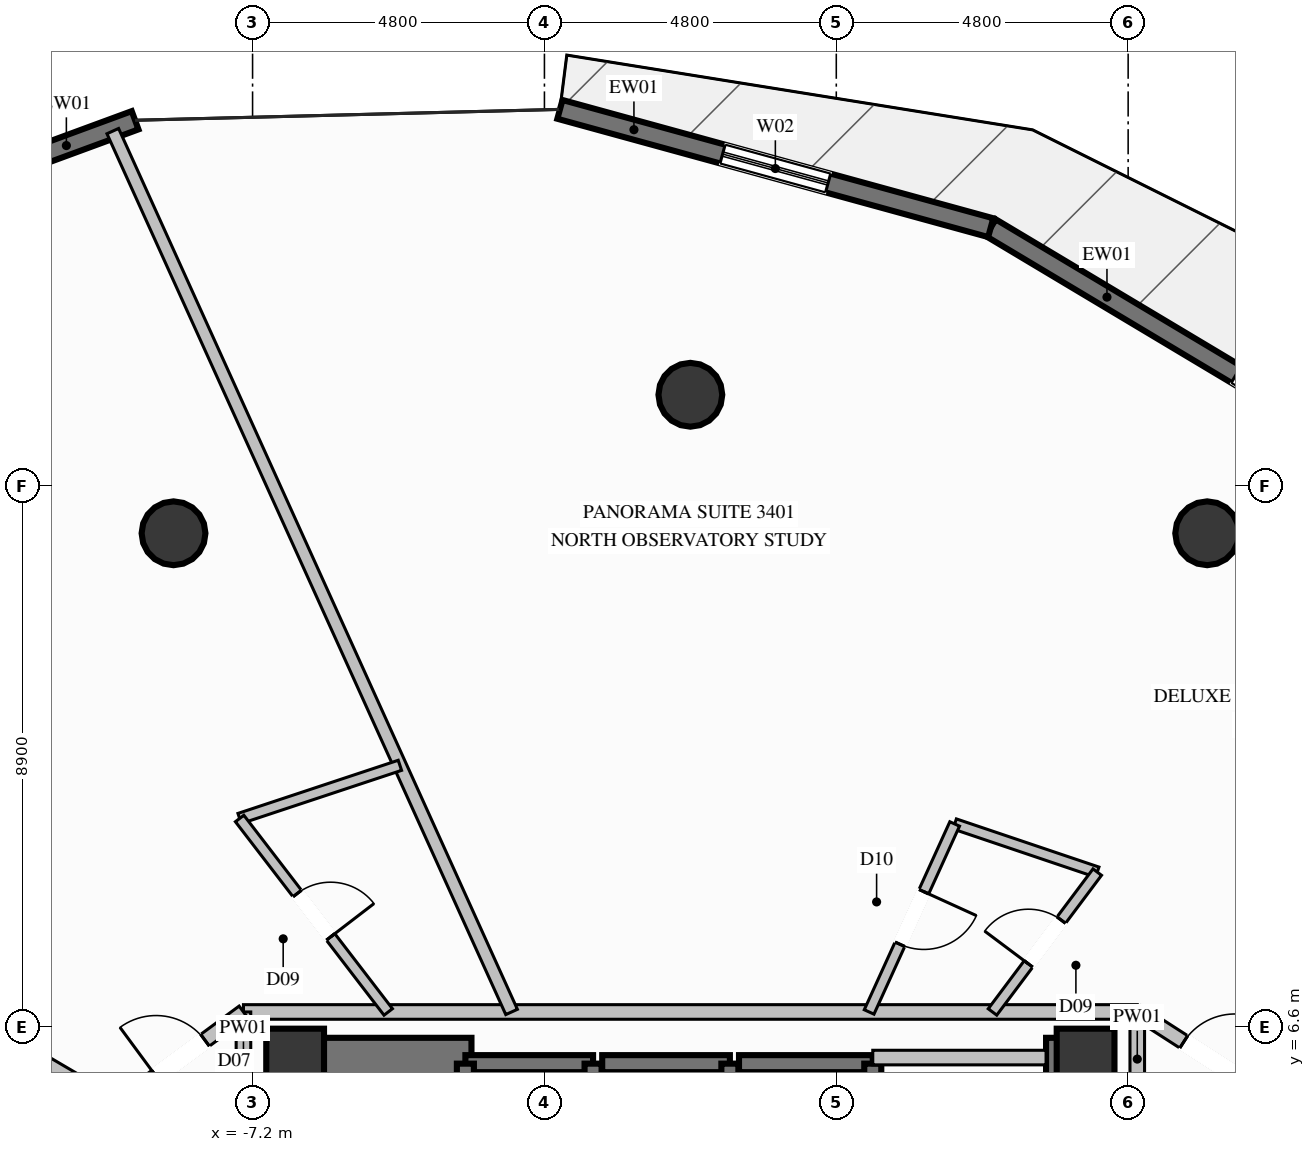
"""IFC4 building model, lengths in metres.
Left out: names, types, materials, properties, quantities, classifications, styles, units other than length and angle.
Written with IfcOpenShell. Run it as: python <this file> out.ifc"""

import sys

from ifc_helpers import new_model, si_unit, direction, frame, frame_2d, origin, origin_2d, place, context, subcontext, project, spatial, rectangle, circle, extrude, element, fill, save


model = new_model("IFC4")
c1 = context("Model", 3, precision=1e-05, world=origin(), true_north=direction((0.0, 1.0)))
c2 = subcontext(c1, "Body", "Model", "MODEL_VIEW")
j1 = project(units=[si_unit("LENGTHUNIT", "METRE"), si_unit("PLANEANGLEUNIT", "RADIAN")], contexts=[c1])
p1 = place(None, origin())
s1 = spatial("IfcSite", under=j1, at=p1, CompositionType="ELEMENT")
p2 = place(p1, origin())
s2 = spatial("IfcBuilding", under=s1, at=p2, CompositionType="ELEMENT")
p3 = place(p2, frame((0.0, 0.0, 127.8)))
s3 = spatial("IfcBuildingStorey", under=s2, at=p3, CompositionType="ELEMENT", Elevation=127.8)
for number, where, z_axis, x_axis in (
    (1, (6.5, 6.1, 0.0), (0.0, 0.0, 1.0), (1.0, 0.0, 0.0)),
    (2, (-6.5, 6.1, 0.0), (0.0, 0.0, 1.0), (1.0, 0.0, 0.0)),
):
    element("IfcColumn", number, at=place(p3, frame(where, z_axis=z_axis, x_axis=x_axis)), inside=s3, PredefinedType="COLUMN", context=c2, shape_type="SweptSolid", body=[
        extrude(rectangle(XDim=0.95, YDim=0.95, at=origin_2d()), origin(), (0.0, 0.0, 1.0), 3.6),
    ])
p4 = place(p3, frame((-6.175, 6.1, 0.0), z_axis=(0.0, 0.0, 1.0), x_axis=(1.0, 0.0, 0.0)))
e3 = element("IfcWall", 3, at=p4, inside=s3, PredefinedType="SHEAR", context=c2, shape_type="SweptSolid", body=[
    extrude(rectangle(XDim=2.575, YDim=0.65, at=frame_2d((1.288, 0.0))), origin(), (0.0, 0.0, 1.0), 3.6),
])
p5 = place(p3, frame((5.85, 6.1, 0.0), z_axis=(0.0, 0.0, 1.0), x_axis=(1.0, 0.0, 0.0)))
e4 = element("IfcWall", 4, at=p5, inside=s3, PredefinedType="SHEAR", context=c2, shape_type="SweptSolid", body=[
    extrude(rectangle(XDim=0.325, YDim=0.65, at=frame_2d((0.163, 0.0))), origin(), (0.0, 0.0, 1.0), 3.6),
])
p6 = place(p3, frame((-6.5, 2.35, 0.0), z_axis=(0.0, 0.0, 1.0), x_axis=(0.0, 1.0, 0.0)))
e5 = element("IfcWall", 5, at=p6, inside=s3, PredefinedType="SHEAR", context=c2, shape_type="SweptSolid", body=[
    extrude(rectangle(XDim=4.075, YDim=0.65, at=frame_2d((2.038, 0.0))), origin(), (0.0, 0.0, 1.0), 3.6),
])
p7 = place(p3, frame((6.5, 3.35, 0.0), z_axis=(0.0, 0.0, 1.0), x_axis=(0.0, 1.0, 0.0)))
e6 = element("IfcWall", 6, at=p7, inside=s3, PredefinedType="SHEAR", context=c2, shape_type="SweptSolid", body=[
    extrude(rectangle(XDim=3.075, YDim=0.65, at=frame_2d((1.538, 0.0))), origin(), (0.0, 0.0, 1.0), 3.6),
])
for number, where, z_axis, x_axis in (
    (7, (8.5, 14.722, 0.0), (0.0, 0.0, 1.0), (1.0, 0.0, 0.0)),
    (8, (0.0, 17.0, 0.0), (0.0, 0.0, 1.0), (1.0, 0.0, 0.0)),
    (9, (-8.5, 14.722, 0.0), (0.0, 0.0, 1.0), (1.0, 0.0, 0.0)),
):
    element("IfcColumn", number, at=place(p3, frame(where, z_axis=z_axis, x_axis=x_axis)), inside=s3, PredefinedType="COLUMN", context=c2, shape_type="SweptSolid", body=[
        extrude(circle(Radius=0.525, at=origin_2d()), origin(), (0.0, 0.0, 1.0), 3.6),
    ])
p8 = place(p3, frame((4.94, 19.748, 0.0), z_axis=(0.0, 0.0, 1.0), x_axis=(0.858360940194, -0.51304629065, 0.0)))
e10 = element("IfcWall", 10, at=p8, inside=s3, PredefinedType="SOLIDWALL", context=c2, shape_type="SweptSolid", body=[
    extrude(rectangle(XDim=7.559, YDim=0.32, at=frame_2d((3.779, 0.0))), origin(), (0.0, 0.0, 1.0), 3.35),
])
p9 = place(p8, frame((4.704, 0.0, 0.35)))
e11 = element("IfcOpeningElement", 11, at=p9, cuts=e10, PredefinedType="OPENING", context=c2, shape_type="SweptSolid", body=[
    extrude(rectangle(XDim=1.8, YDim=2.6, at=frame_2d((0.9, 1.3))), frame((0.0, 0.17, 0.0), z_axis=(0.0, -1.0, 0.0), x_axis=(1.0, 0.0, 0.0)), (0.0, 0.0, 1.0), 0.34),
])
p10 = place(p3, frame((-2.145, 21.693, 0.0), z_axis=(0.0, 0.0, 1.0), x_axis=(0.964319993606, -0.264739400036, 0.0)))
e12 = element("IfcWall", 12, at=p10, inside=s3, PredefinedType="SOLIDWALL", context=c2, shape_type="SweptSolid", body=[
    extrude(rectangle(XDim=7.347, YDim=0.32, at=frame_2d((3.674, 0.0))), origin(), (0.0, 0.0, 1.0), 3.35),
])
p11 = place(p10, frame((2.774, 0.0, 0.35)))
e13 = element("IfcOpeningElement", 13, at=p11, cuts=e12, PredefinedType="OPENING", context=c2, shape_type="SweptSolid", body=[
    extrude(rectangle(XDim=1.8, YDim=2.6, at=frame_2d((0.9, 1.3))), frame((0.0, 0.17, 0.0), z_axis=(0.0, -1.0, 0.0), x_axis=(1.0, 0.0, 0.0)), (0.0, 0.0, 1.0), 0.34),
])
p12 = place(p3, frame((-15.338, 19.23, 0.0), z_axis=(0.0, 0.0, 1.0), x_axis=(0.938461564884, 0.345383686986, 0.0)))
e14 = element("IfcWall", 14, at=p12, inside=s3, PredefinedType="SOLIDWALL", context=c2, shape_type="SweptSolid", body=[
    extrude(rectangle(XDim=6.613, YDim=0.32, at=frame_2d((3.306, 0.0))), origin(), (0.0, 0.0, 1.0), 3.35),
])
p13 = place(p12, frame((2.154, 0.0, 0.35)))
e15 = element("IfcOpeningElement", 15, at=p13, cuts=e14, PredefinedType="OPENING", context=c2, shape_type="SweptSolid", body=[
    extrude(rectangle(XDim=1.8, YDim=2.6, at=frame_2d((0.9, 1.3))), frame((0.0, 0.17, 0.0), z_axis=(0.0, -1.0, 0.0), x_axis=(1.0, 0.0, 0.0)), (0.0, 0.0, 1.0), 0.34),
])
p14 = place(p3, frame((-1.6, 6.0, 0.0), z_axis=(0.0, 0.0, 1.0), x_axis=(-1.0, 0.0, 0.0)))
e16 = element("IfcWall", 16, at=p14, inside=s3, PredefinedType="SOLIDWALL", context=c2, shape_type="SweptSolid", body=[
    extrude(rectangle(XDim=2.1, YDim=0.28, at=frame_2d((1.05, 0.0))), origin(), (0.0, 0.0, 1.0), 3.35),
])
for number, where, z_axis, x_axis in (
    (17, (-3.7, 6.0, 0.0), (0.0, 0.0, 1.0), (0.0, -1.0, 0.0)),
    (18, (-1.6, 3.5, 0.0), (0.0, 0.0, 1.0), (0.0, 1.0, 0.0)),
):
    element("IfcWall", number, at=place(p3, frame(where, z_axis=z_axis, x_axis=x_axis)), inside=s3, PredefinedType="SOLIDWALL", context=c2, shape_type="SweptSolid", body=[
        extrude(rectangle(XDim=2.5, YDim=0.28, at=frame_2d((1.25, 0.0))), origin(), (0.0, 0.0, 1.0), 3.35),
    ])
p15 = place(p3, frame((0.65, 6.0, 0.0), z_axis=(0.0, 0.0, 1.0), x_axis=(-1.0, 0.0, 0.0)))
e19 = element("IfcWall", 19, at=p15, inside=s3, PredefinedType="SOLIDWALL", context=c2, shape_type="SweptSolid", body=[
    extrude(rectangle(XDim=2.1, YDim=0.28, at=frame_2d((1.05, 0.0))), origin(), (0.0, 0.0, 1.0), 3.35),
])
p16 = place(p3, frame((0.65, 3.5, 0.0), z_axis=(0.0, 0.0, 1.0), x_axis=(0.0, 1.0, 0.0)))
e20 = element("IfcWall", 20, at=p16, inside=s3, PredefinedType="SOLIDWALL", context=c2, shape_type="SweptSolid", body=[
    extrude(rectangle(XDim=2.5, YDim=0.28, at=frame_2d((1.25, 0.0))), origin(), (0.0, 0.0, 1.0), 3.35),
])
p17 = place(p3, frame((3.0, 6.0, 0.0), z_axis=(0.0, 0.0, 1.0), x_axis=(-1.0, 0.0, 0.0)))
e21 = element("IfcWall", 21, at=p17, inside=s3, PredefinedType="SOLIDWALL", context=c2, shape_type="SweptSolid", body=[
    extrude(rectangle(XDim=2.2, YDim=0.28, at=frame_2d((1.1, 0.0))), origin(), (0.0, 0.0, 1.0), 3.35),
])
p18 = place(p3, frame((3.0, 3.5, 0.0), z_axis=(0.0, 0.0, 1.0), x_axis=(0.0, 1.0, 0.0)))
e22 = element("IfcWall", 22, at=p18, inside=s3, PredefinedType="SOLIDWALL", context=c2, shape_type="SweptSolid", body=[
    extrude(rectangle(XDim=2.5, YDim=0.28, at=frame_2d((1.25, 0.0))), origin(), (0.0, 0.0, 1.0), 3.35),
])
p19 = place(p3, frame((-7.35, 6.85, 0.0), z_axis=(0.0, 0.0, 1.0), x_axis=(1.0, 0.0, 0.0)))
e23 = element("IfcWall", 23, at=p19, inside=s3, PredefinedType="PARTITIONING", context=c2, shape_type="SweptSolid", body=[
    extrude(rectangle(XDim=14.7, YDim=0.24, at=frame_2d((7.35, 0.0))), origin(), (0.0, 0.0, 1.0), 2.435),
])
p20 = place(p3, frame((-7.35, 4.95, 0.0), z_axis=(0.0, 0.0, 1.0), x_axis=(0.0, 1.0, 0.0)))
e24 = element("IfcWall", 24, at=p20, inside=s3, PredefinedType="PARTITIONING", context=c2, shape_type="SweptSolid", body=[
    extrude(rectangle(XDim=1.9, YDim=0.24, at=frame_2d((0.95, 0.0))), origin(), (0.0, 0.0, 1.0), 2.435),
])
p21 = place(p3, frame((7.35, 5.3, 0.0), z_axis=(0.0, 0.0, 1.0), x_axis=(0.0, 1.0, 0.0)))
e25 = element("IfcWall", 25, at=p21, inside=s3, PredefinedType="PARTITIONING", context=c2, shape_type="SweptSolid", body=[
    extrude(rectangle(XDim=1.55, YDim=0.24, at=frame_2d((0.775, 0.0))), origin(), (0.0, 0.0, 1.0), 2.435),
])
p22 = place(p3, frame((3.0, 6.1, 0.0), z_axis=(0.0, 0.0, 1.0), x_axis=(1.0, 0.0, 0.0)))
e26 = element("IfcWall", 26, at=p22, inside=s3, PredefinedType="PARTITIONING", context=c2, shape_type="SweptSolid", body=[
    extrude(rectangle(XDim=2.85, YDim=0.24, at=frame_2d((1.425, 0.0))), origin(), (0.0, 0.0, 1.0), 2.435),
])
p23 = place(p3, frame((-9.42, 5.325, 0.0), z_axis=(0.0, 0.0, 1.0), x_axis=(-0.862477017481, 0.506096230293, 0.0)))
e27 = element("IfcWall", 27, at=p23, inside=s3, PredefinedType="PARTITIONING", context=c2, shape_type="SweptSolid", body=[
    extrude(rectangle(XDim=5.637, YDim=0.21, at=frame_2d((2.819, 0.0))), origin(), (0.0, 0.0, 1.0), 2.717),
])
p24 = place(p3, frame((4.347, 9.942, 0.0), z_axis=(0.0, 0.0, 1.0), x_axis=(0.947423144853, -0.319983413004, 0.0)))
e28 = element("IfcWall", 28, at=p24, inside=s3, PredefinedType="PLUMBINGWALL", context=c2, shape_type="SweptSolid", body=[
    extrude(rectangle(XDim=2.475, YDim=0.175, at=frame_2d((1.238, 0.0))), origin(), (0.0, 0.0, 1.0), 3.35),
])
p25 = place(p3, frame((4.347, 9.942, 0.0), z_axis=(0.0, 0.0, 1.0), x_axis=(-0.414198201163, -0.910186711699, 0.0)))
e29 = element("IfcWall", 29, at=p25, inside=s3, PredefinedType="PLUMBINGWALL", context=c2, shape_type="SweptSolid", body=[
    extrude(rectangle(XDim=3.397, YDim=0.175, at=frame_2d((1.698, 0.0))), origin(), (0.0, 0.0, 1.0), 3.35),
])
p26 = place(p25, frame((1.224, 0.0, 0.0)))
e30 = element("IfcOpeningElement", 30, at=p26, cuts=e29, PredefinedType="OPENING", context=c2, shape_type="SweptSolid", body=[
    extrude(rectangle(XDim=0.95, YDim=2.1, at=frame_2d((0.475, 1.05))), frame((0.0, 0.098, 0.0), z_axis=(0.0, -1.0, 0.0), x_axis=(1.0, 0.0, 0.0)), (0.0, 0.0, 1.0), 0.195),
])
p27 = place(p3, frame((4.969, 6.85, 0.0), z_axis=(0.0, 0.0, 1.0), x_axis=(0.59956491451, 0.80032612933, 0.0)))
e31 = element("IfcWall", 31, at=p27, inside=s3, PredefinedType="PLUMBINGWALL", context=c2, shape_type="SweptSolid", body=[
    extrude(rectangle(XDim=2.874, YDim=0.175, at=frame_2d((1.437, 0.0))), origin(), (0.0, 0.0, 1.0), 2.717),
])
p28 = place(p27, frame((0.987, 0.0, 0.0)))
e32 = element("IfcOpeningElement", 32, at=p28, cuts=e31, PredefinedType="OPENING", context=c2, shape_type="SweptSolid", body=[
    extrude(rectangle(XDim=0.9, YDim=2.1, at=frame_2d((0.45, 1.05))), frame((0.0, 0.098, 0.0), z_axis=(0.0, -1.0, 0.0), x_axis=(1.0, 0.0, 0.0)), (0.0, 0.0, 1.0), 0.195),
])
p29 = place(p3, frame((7.35, 6.85, 0.0), z_axis=(0.0, 0.0, 1.0), x_axis=(0.840910978735, -0.541173471119, 0.0)))
e33 = element("IfcWall", 33, at=p29, inside=s3, PredefinedType="PARTITIONING", context=c2, shape_type="SweptSolid", body=[
    extrude(rectangle(XDim=2.818, YDim=0.24, at=frame_2d((1.409, 0.0))), origin(), (0.0, 0.0, 1.0), 3.35),
])
p30 = place(p29, frame((0.909, 0.0, 0.0)))
e34 = element("IfcOpeningElement", 34, at=p30, cuts=e33, PredefinedType="OPENING", context=c2, shape_type="SweptSolid", body=[
    extrude(rectangle(XDim=1.0, YDim=2.2, at=frame_2d((0.5, 1.1))), frame((0.0, 0.13, 0.0), z_axis=(0.0, -1.0, 0.0), x_axis=(1.0, 0.0, 0.0)), (0.0, 0.0, 1.0), 0.26),
])
p31 = place(p3, frame((-2.94, 6.85, 0.0), z_axis=(0.0, 0.0, 1.0), x_axis=(-0.412479187099, 0.910967024765, 0.0)))
e35 = element("IfcWall", 35, at=p31, inside=s3, PredefinedType="PARTITIONING", context=c2, shape_type="SweptSolid", body=[
    extrude(rectangle(XDim=15.902, YDim=0.21, at=frame_2d((7.951, 0.0))), origin(), (0.0, 0.0, 1.0), 3.35),
])
p32 = place(p3, frame((-7.413, 10.032, 0.0), z_axis=(0.0, 0.0, 1.0), x_axis=(0.949183203982, 0.314724078008, 0.0)))
e36 = element("IfcWall", 36, at=p32, inside=s3, PredefinedType="PLUMBINGWALL", context=c2, shape_type="SweptSolid", body=[
    extrude(rectangle(XDim=2.777, YDim=0.175, at=frame_2d((1.389, 0.0))), origin(), (0.0, 0.0, 1.0), 3.35),
])
p33 = place(p3, frame((-7.413, 10.032, 0.0), z_axis=(0.0, 0.0, 1.0), x_axis=(0.609160709833, -0.793046801643, 0.0)))
e37 = element("IfcWall", 37, at=p33, inside=s3, PredefinedType="PLUMBINGWALL", context=c2, shape_type="SweptSolid", body=[
    extrude(rectangle(XDim=4.012, YDim=0.175, at=frame_2d((2.006, 0.0))), origin(), (0.0, 0.0, 1.0), 2.717),
])
p34 = place(p33, frame((1.556, 0.0, 0.0)))
e38 = element("IfcOpeningElement", 38, at=p34, cuts=e37, PredefinedType="OPENING", context=c2, shape_type="SweptSolid", body=[
    extrude(rectangle(XDim=0.9, YDim=2.1, at=frame_2d((0.45, 1.05))), frame((0.0, 0.098, 0.0), z_axis=(0.0, -1.0, 0.0), x_axis=(1.0, 0.0, 0.0)), (0.0, 0.0, 1.0), 0.195),
])
p35 = place(p3, frame((-9.42, 5.325, 0.0), z_axis=(0.0, 0.0, 1.0), x_axis=(0.805053450612, 0.593202277185, 0.0)))
e39 = element("IfcWall", 39, at=p35, inside=s3, PredefinedType="PARTITIONING", context=c2, shape_type="SweptSolid", body=[
    extrude(rectangle(XDim=2.571, YDim=0.24, at=frame_2d((1.286, 0.0))), origin(), (0.0, 0.0, 1.0), 3.35),
])
p36 = place(p35, frame((0.786, 0.0, 0.0)))
e40 = element("IfcOpeningElement", 40, at=p36, cuts=e39, PredefinedType="OPENING", context=c2, shape_type="SweptSolid", body=[
    extrude(rectangle(XDim=1.0, YDim=2.2, at=frame_2d((0.5, 1.1))), frame((0.0, 0.13, 0.0), z_axis=(0.0, -1.0, 0.0), x_axis=(1.0, 0.0, 0.0)), (0.0, 0.0, 1.0), 0.26),
])
p37 = place(p9, origin())
e41 = element("IfcWindow", 41, at=p37, inside=s3, PartitioningType="SINGLE_PANEL", PredefinedType="WINDOW", context=c2, shape_type="SweptSolid", body=[
    extrude(rectangle(XDim=1.8, YDim=2.6, at=frame_2d((0.9, 1.3))), frame((0.0, 0.03, 0.0), z_axis=(0.0, -1.0, 0.0), x_axis=(1.0, 0.0, 0.0)), (0.0, 0.0, 1.0), 0.06),
])
fill(e11, e41)
p38 = place(p11, origin())
e42 = element("IfcWindow", 42, at=p38, inside=s3, PartitioningType="SINGLE_PANEL", PredefinedType="WINDOW", context=c2, shape_type="SweptSolid", body=[
    extrude(rectangle(XDim=1.8, YDim=2.6, at=frame_2d((0.9, 1.3))), frame((0.0, 0.03, 0.0), z_axis=(0.0, -1.0, 0.0), x_axis=(1.0, 0.0, 0.0)), (0.0, 0.0, 1.0), 0.06),
])
fill(e13, e42)
p39 = place(p28, origin())
e43 = element("IfcDoor", 43, at=p39, inside=s3, OperationType="SINGLE_SWING_LEFT", PredefinedType="DOOR", context=c2, shape_type="SweptSolid", body=[
    extrude(rectangle(XDim=0.9, YDim=2.1, at=frame_2d((0.45, 1.05))), frame((0.0, 0.025, 0.0), z_axis=(0.0, -1.0, 0.0), x_axis=(1.0, 0.0, 0.0)), (0.0, 0.0, 1.0), 0.05),
])
fill(e32, e43)
p40 = place(p30, origin())
e44 = element("IfcDoor", 44, at=p40, inside=s3, OperationType="SINGLE_SWING_RIGHT", PredefinedType="DOOR", context=c2, shape_type="SweptSolid", body=[
    extrude(rectangle(XDim=1.0, YDim=2.2, at=frame_2d((0.5, 1.1))), frame((0.0, 0.025, 0.0), z_axis=(0.0, -1.0, 0.0), x_axis=(1.0, 0.0, 0.0)), (0.0, 0.0, 1.0), 0.05),
])
fill(e34, e44)
p41 = place(p26, origin())
e45 = element("IfcDoor", 45, at=p41, inside=s3, OperationType="SINGLE_SWING_LEFT", PredefinedType="DOOR", context=c2, shape_type="SweptSolid", body=[
    extrude(rectangle(XDim=0.95, YDim=2.1, at=frame_2d((0.475, 1.05))), frame((0.0, 0.025, 0.0), z_axis=(0.0, -1.0, 0.0), x_axis=(1.0, 0.0, 0.0)), (0.0, 0.0, 1.0), 0.05),
])
fill(e30, e45)
p42 = place(p34, origin())
e46 = element("IfcDoor", 46, at=p42, inside=s3, OperationType="SINGLE_SWING_RIGHT", PredefinedType="DOOR", context=c2, shape_type="SweptSolid", body=[
    extrude(rectangle(XDim=0.9, YDim=2.1, at=frame_2d((0.45, 1.05))), frame((0.0, 0.025, 0.0), z_axis=(0.0, -1.0, 0.0), x_axis=(1.0, 0.0, 0.0)), (0.0, 0.0, 1.0), 0.05),
])
fill(e38, e46)
p43 = place(p36, origin())
e47 = element("IfcDoor", 47, at=p43, inside=s3, OperationType="SINGLE_SWING_LEFT", PredefinedType="DOOR", context=c2, shape_type="SweptSolid", body=[
    extrude(rectangle(XDim=1.0, YDim=2.2, at=frame_2d((0.5, 1.1))), frame((0.0, 0.025, 0.0), z_axis=(0.0, -1.0, 0.0), x_axis=(1.0, 0.0, 0.0)), (0.0, 0.0, 1.0), 0.05),
])
fill(e40, e47)
save(model, sys.argv[1])
